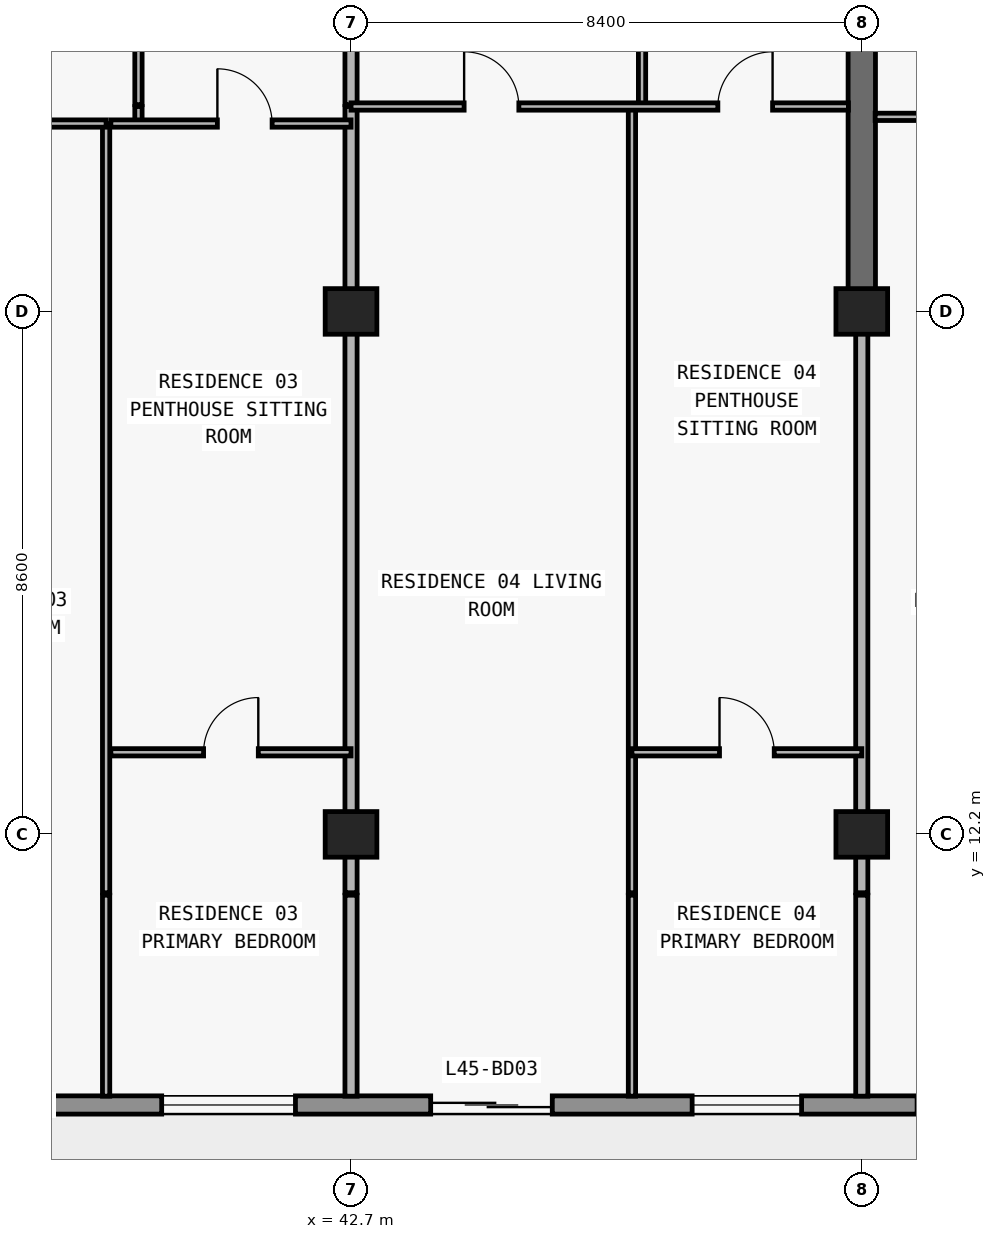
"""IFC4 building model, lengths in metres.
Left out: names, types, materials, properties, quantities, classifications, styles, units other than length and angle.
Written with IfcOpenShell. Run it as: python <this file> out.ifc"""

import sys

from ifc_helpers import new_model, si_unit, direction, frame, frame_2d, origin, origin_2d, place, context, subcontext, project, spatial, rectangle, extrude, element, fill, save


model = new_model("IFC4")
c1 = context("Model", 3, precision=1e-05, world=origin(), true_north=direction((0.0, 1.0)))
c2 = subcontext(c1, "Body", "Model", "MODEL_VIEW")
j1 = project(units=[si_unit("LENGTHUNIT", "METRE"), si_unit("PLANEANGLEUNIT", "RADIAN")], contexts=[c1])
p1 = place(None, origin())
s1 = spatial("IfcSite", under=j1, at=p1, CompositionType="ELEMENT")
p2 = place(p1, origin())
s2 = spatial("IfcBuilding", under=s1, at=p2, CompositionType="ELEMENT")
p3 = place(p2, frame((0.0, 0.0, 163.8)))
s3 = spatial("IfcBuildingStorey", under=s2, at=p3, CompositionType="ELEMENT", Elevation=163.8)
for number, where, z_axis, x_axis in (
    (1, (42.7, 12.2, 0.0), (0.0, 0.0, 1.0), (1.0, 0.0, 0.0)),
    (2, (51.1, 12.2, 0.0), (0.0, 0.0, 1.0), (1.0, 0.0, 0.0)),
    (3, (42.7, 20.8, 0.0), (0.0, 0.0, 1.0), (1.0, 0.0, 0.0)),
    (4, (51.1, 20.8, 0.0), (0.0, 0.0, 1.0), (1.0, 0.0, 0.0)),
):
    element("IfcColumn", number, at=place(p3, frame(where, z_axis=z_axis, x_axis=x_axis)), inside=s3, PredefinedType="COLUMN", context=c2, shape_type="SweptSolid", body=[
        extrude(rectangle(XDim=0.85, YDim=0.75, at=origin_2d()), origin(), (0.0, 0.0, 1.0), 3.05),
    ])
p4 = place(p3, frame((51.1, 20.8, 0.0), z_axis=(0.0, 0.0, 1.0), x_axis=(0.0, 1.0, 0.0)))
e5 = element("IfcWall", 5, at=p4, inside=s3, PredefinedType="SHEAR", context=c2, shape_type="SweptSolid", body=[
    extrude(rectangle(XDim=8.6, YDim=0.45, at=frame_2d((4.3, 0.0))), origin(), (0.0, 0.0, 1.0), 3.05),
])
p5 = place(p3, frame((67.7, 7.75, 0.0), z_axis=(0.0, 0.0, 1.0), x_axis=(-1.0, 0.0, 0.0)))
e6 = element("IfcWall", 6, at=p5, inside=s3, PredefinedType="STANDARD", context=c2, shape_type="SweptSolid", body=[
    extrude(rectangle(XDim=57.6, YDim=0.3, at=frame_2d((28.8, 0.0))), origin(), (0.0, 0.0, 1.0), 3.05),
])
p6 = place(p5, frame((54.69, 0.0, 0.0)))
e7 = element("IfcOpeningElement", 7, at=p6, cuts=e6, PredefinedType="OPENING", context=c2, shape_type="SweptSolid", body=[
    extrude(rectangle(XDim=2.0, YDim=2.3, at=frame_2d((1.0, 1.15))), frame((0.0, 0.16, 0.0), z_axis=(0.0, -1.0, 0.0), x_axis=(1.0, 0.0, 0.0)), (0.0, 0.0, 1.0), 0.32),
])
p7 = place(p5, frame((50.21, 0.0, 0.65)))
e8 = element("IfcOpeningElement", 8, at=p7, cuts=e6, PredefinedType="OPENING", context=c2, shape_type="SweptSolid", body=[
    extrude(rectangle(XDim=2.6, YDim=1.85, at=frame_2d((1.3, 0.925))), frame((0.0, 0.16, 0.0), z_axis=(0.0, -1.0, 0.0), x_axis=(1.0, 0.0, 0.0)), (0.0, 0.0, 1.0), 0.32),
])
p8 = place(p5, frame((44.1, 0.0, 0.85)))
e9 = element("IfcOpeningElement", 9, at=p8, cuts=e6, PredefinedType="OPENING", context=c2, shape_type="SweptSolid", body=[
    extrude(rectangle(XDim=2.2, YDim=1.55, at=frame_2d((1.1, 0.775))), frame((0.0, 0.16, 0.0), z_axis=(0.0, -1.0, 0.0), x_axis=(1.0, 0.0, 0.0)), (0.0, 0.0, 1.0), 0.32),
])
p9 = place(p5, frame((37.69, 0.0, 0.0)))
e10 = element("IfcOpeningElement", 10, at=p9, cuts=e6, PredefinedType="OPENING", context=c2, shape_type="SweptSolid", body=[
    extrude(rectangle(XDim=2.0, YDim=2.3, at=frame_2d((1.0, 1.15))), frame((0.0, 0.16, 0.0), z_axis=(0.0, -1.0, 0.0), x_axis=(1.0, 0.0, 0.0)), (0.0, 0.0, 1.0), 0.32),
])
p10 = place(p5, frame((33.59, 0.0, 0.85)))
e11 = element("IfcOpeningElement", 11, at=p10, cuts=e6, PredefinedType="OPENING", context=c2, shape_type="SweptSolid", body=[
    extrude(rectangle(XDim=1.8, YDim=1.55, at=frame_2d((0.9, 0.775))), frame((0.0, 0.16, 0.0), z_axis=(0.0, -1.0, 0.0), x_axis=(1.0, 0.0, 0.0)), (0.0, 0.0, 1.0), 0.32),
])
p11 = place(p5, frame((25.914, 0.0, 0.85)))
e12 = element("IfcOpeningElement", 12, at=p11, cuts=e6, PredefinedType="OPENING", context=c2, shape_type="SweptSolid", body=[
    extrude(rectangle(XDim=2.2, YDim=1.55, at=frame_2d((1.1, 0.775))), frame((0.0, 0.16, 0.0), z_axis=(0.0, -1.0, 0.0), x_axis=(1.0, 0.0, 0.0)), (0.0, 0.0, 1.0), 0.32),
])
p12 = place(p5, frame((21.69, 0.0, 0.0)))
e13 = element("IfcOpeningElement", 13, at=p12, cuts=e6, PredefinedType="OPENING", context=c2, shape_type="SweptSolid", body=[
    extrude(rectangle(XDim=2.0, YDim=2.3, at=frame_2d((1.0, 1.15))), frame((0.0, 0.16, 0.0), z_axis=(0.0, -1.0, 0.0), x_axis=(1.0, 0.0, 0.0)), (0.0, 0.0, 1.0), 0.32),
])
p13 = place(p5, frame((17.59, 0.0, 0.85)))
e14 = element("IfcOpeningElement", 14, at=p13, cuts=e6, PredefinedType="OPENING", context=c2, shape_type="SweptSolid", body=[
    extrude(rectangle(XDim=1.8, YDim=1.55, at=frame_2d((0.9, 0.775))), frame((0.0, 0.16, 0.0), z_axis=(0.0, -1.0, 0.0), x_axis=(1.0, 0.0, 0.0)), (0.0, 0.0, 1.0), 0.32),
])
p14 = place(p5, frame((13.69, 0.0, 0.0)))
e15 = element("IfcOpeningElement", 15, at=p14, cuts=e6, PredefinedType="OPENING", context=c2, shape_type="SweptSolid", body=[
    extrude(rectangle(XDim=2.0, YDim=2.3, at=frame_2d((1.0, 1.15))), frame((0.0, 0.16, 0.0), z_axis=(0.0, -1.0, 0.0), x_axis=(1.0, 0.0, 0.0)), (0.0, 0.0, 1.0), 0.32),
])
p15 = place(p5, frame((9.01, 0.0, 0.65)))
e16 = element("IfcOpeningElement", 16, at=p15, cuts=e6, PredefinedType="OPENING", context=c2, shape_type="SweptSolid", body=[
    extrude(rectangle(XDim=2.6, YDim=1.85, at=frame_2d((1.3, 0.925))), frame((0.0, 0.16, 0.0), z_axis=(0.0, -1.0, 0.0), x_axis=(1.0, 0.0, 0.0)), (0.0, 0.0, 1.0), 0.32),
])
p16 = place(p5, frame((3.0, 0.0, 0.85)))
e17 = element("IfcOpeningElement", 17, at=p16, cuts=e6, PredefinedType="OPENING", context=c2, shape_type="SweptSolid", body=[
    extrude(rectangle(XDim=2.2, YDim=1.55, at=frame_2d((1.1, 0.775))), frame((0.0, 0.16, 0.0), z_axis=(0.0, -1.0, 0.0), x_axis=(1.0, 0.0, 0.0)), (0.0, 0.0, 1.0), 0.32),
])
p17 = place(p3, frame((38.672, 7.895, 0.0), z_axis=(0.0, 0.0, 1.0), x_axis=(0.0, 1.0, 0.0)))
e18 = element("IfcWall", 18, at=p17, inside=s3, PredefinedType="PARTITIONING", context=c2, shape_type="SweptSolid", body=[
    extrude(rectangle(XDim=3.305, YDim=0.12, at=frame_2d((1.652, 0.0))), origin(), (0.0, 0.0, 1.0), 3.05),
])
p18 = place(p3, frame((38.672, 11.24, 0.0), z_axis=(0.0, 0.0, 1.0), x_axis=(0.0, 1.0, 0.0)))
e19 = element("IfcWall", 19, at=p18, inside=s3, PredefinedType="PARTITIONING", context=c2, shape_type="SweptSolid", body=[
    extrude(rectangle(XDim=12.65, YDim=0.12, at=frame_2d((6.325, 0.0))), origin(), (0.0, 0.0, 1.0), 2.499),
])
p19 = place(p3, frame((39.204, 23.89, 0.0), z_axis=(0.0, 0.0, 1.0), x_axis=(0.0, 1.0, 0.0)))
e20 = element("IfcWall", 20, at=p19, inside=s3, PredefinedType="PARTITIONING", context=c2, shape_type="SweptSolid", body=[
    extrude(rectangle(XDim=0.28, YDim=0.12, at=frame_2d((0.14, 0.0))), origin(), (0.0, 0.0, 1.0), 3.05),
])
p20 = place(p3, frame((39.204, 24.2, 0.0), z_axis=(0.0, 0.0, 1.0), x_axis=(0.0, 1.0, 0.0)))
e21 = element("IfcWall", 21, at=p20, inside=s3, PredefinedType="PARTITIONING", context=c2, shape_type="SweptSolid", body=[
    extrude(rectangle(XDim=4.84, YDim=0.12, at=frame_2d((2.42, 0.0))), origin(), (0.0, 0.0, 1.0), 3.05),
])
p21 = place(p20, frame((1.97, 0.0, 0.0)))
e22 = element("IfcOpeningElement", 22, at=p21, cuts=e21, PredefinedType="OPENING", context=c2, shape_type="SweptSolid", body=[
    extrude(rectangle(XDim=0.9, YDim=2.15, at=frame_2d((0.45, 1.075))), frame((0.0, 0.07, 0.0), z_axis=(0.0, -1.0, 0.0), x_axis=(1.0, 0.0, 0.0)), (0.0, 0.0, 1.0), 0.14),
])
p22 = place(p3, frame((42.7, 7.895, 0.0), z_axis=(0.0, 0.0, 1.0), x_axis=(0.0, 1.0, 0.0)))
e23 = element("IfcWall", 23, at=p22, inside=s3, PredefinedType="PARTITIONING", context=c2, shape_type="SweptSolid", body=[
    extrude(rectangle(XDim=3.305, YDim=0.2, at=frame_2d((1.652, 0.0))), origin(), (0.0, 0.0, 1.0), 3.05),
])
p23 = place(p3, frame((42.7, 11.24, 0.0), z_axis=(0.0, 0.0, 1.0), x_axis=(0.0, 1.0, 0.0)))
e24 = element("IfcWall", 24, at=p23, inside=s3, PredefinedType="PARTITIONING", context=c2, shape_type="SweptSolid", body=[
    extrude(rectangle(XDim=12.93, YDim=0.2, at=frame_2d((6.465, 0.0))), origin(), (0.0, 0.0, 1.0), 2.263),
])
p24 = place(p3, frame((42.7, 24.2, 0.0), z_axis=(0.0, 0.0, 1.0), x_axis=(0.0, 1.0, 0.0)))
e25 = element("IfcWall", 25, at=p24, inside=s3, PredefinedType="PARTITIONING", context=c2, shape_type="SweptSolid", body=[
    extrude(rectangle(XDim=4.84, YDim=0.2, at=frame_2d((2.42, 0.0))), origin(), (0.0, 0.0, 1.0), 2.263),
])
p25 = place(p3, frame((47.32, 7.895, 0.0), z_axis=(0.0, 0.0, 1.0), x_axis=(0.0, 1.0, 0.0)))
e26 = element("IfcWall", 26, at=p25, inside=s3, PredefinedType="PARTITIONING", context=c2, shape_type="SweptSolid", body=[
    extrude(rectangle(XDim=3.305, YDim=0.12, at=frame_2d((1.652, 0.0))), origin(), (0.0, 0.0, 1.0), 3.05),
])
p26 = place(p3, frame((47.32, 11.24, 0.0), z_axis=(0.0, 0.0, 1.0), x_axis=(0.0, 1.0, 0.0)))
e27 = element("IfcWall", 27, at=p26, inside=s3, PredefinedType="PARTITIONING", context=c2, shape_type="SweptSolid", body=[
    extrude(rectangle(XDim=12.93, YDim=0.12, at=frame_2d((6.465, 0.0))), origin(), (0.0, 0.0, 1.0), 3.05),
])
p27 = place(p3, frame((47.486, 24.2, 0.0), z_axis=(0.0, 0.0, 1.0), x_axis=(0.0, 1.0, 0.0)))
e28 = element("IfcWall", 28, at=p27, inside=s3, PredefinedType="PARTITIONING", context=c2, shape_type="SweptSolid", body=[
    extrude(rectangle(XDim=4.84, YDim=0.12, at=frame_2d((2.42, 0.0))), origin(), (0.0, 0.0, 1.0), 3.05),
])
p28 = place(p27, frame((1.97, 0.0, 0.0)))
e29 = element("IfcOpeningElement", 29, at=p28, cuts=e28, PredefinedType="OPENING", context=c2, shape_type="SweptSolid", body=[
    extrude(rectangle(XDim=0.9, YDim=2.15, at=frame_2d((0.45, 1.075))), frame((0.0, 0.07, 0.0), z_axis=(0.0, -1.0, 0.0), x_axis=(1.0, 0.0, 0.0)), (0.0, 0.0, 1.0), 0.14),
])
p29 = place(p3, frame((51.1, 7.895, 0.0), z_axis=(0.0, 0.0, 1.0), x_axis=(0.0, 1.0, 0.0)))
e30 = element("IfcWall", 30, at=p29, inside=s3, PredefinedType="PARTITIONING", context=c2, shape_type="SweptSolid", body=[
    extrude(rectangle(XDim=3.305, YDim=0.2, at=frame_2d((1.652, 0.0))), origin(), (0.0, 0.0, 1.0), 3.05),
])
p30 = place(p3, frame((51.1, 11.24, 0.0), z_axis=(0.0, 0.0, 1.0), x_axis=(0.0, 1.0, 0.0)))
e31 = element("IfcWall", 31, at=p30, inside=s3, PredefinedType="PARTITIONING", context=c2, shape_type="SweptSolid", body=[
    extrude(rectangle(XDim=9.555, YDim=0.2, at=frame_2d((4.777, 0.0))), origin(), (0.0, 0.0, 1.0), 2.263),
])
p31 = place(p3, frame((38.75, 13.55, 0.0), z_axis=(0.0, 0.0, 1.0), x_axis=(1.0, 0.0, 0.0)))
e32 = element("IfcWall", 32, at=p31, inside=s3, PredefinedType="PARTITIONING", context=c2, shape_type="SweptSolid", body=[
    extrude(rectangle(XDim=3.95, YDim=0.12, at=frame_2d((1.975, 0.0))), origin(), (0.0, 0.0, 1.0), 3.05),
])
p32 = place(p31, frame((1.525, 0.0, 0.0)))
e33 = element("IfcOpeningElement", 33, at=p32, cuts=e32, PredefinedType="OPENING", context=c2, shape_type="SweptSolid", body=[
    extrude(rectangle(XDim=0.9, YDim=2.15, at=frame_2d((0.45, 1.075))), frame((0.0, 0.07, 0.0), z_axis=(0.0, -1.0, 0.0), x_axis=(1.0, 0.0, 0.0)), (0.0, 0.0, 1.0), 0.14),
])
p33 = place(p3, frame((47.32, 13.55, 0.0), z_axis=(0.0, 0.0, 1.0), x_axis=(1.0, 0.0, 0.0)))
e34 = element("IfcWall", 34, at=p33, inside=s3, PredefinedType="PARTITIONING", context=c2, shape_type="SweptSolid", body=[
    extrude(rectangle(XDim=3.78, YDim=0.12, at=frame_2d((1.89, 0.0))), origin(), (0.0, 0.0, 1.0), 3.05),
])
p34 = place(p33, frame((1.44, 0.0, 0.0)))
e35 = element("IfcOpeningElement", 35, at=p34, cuts=e34, PredefinedType="OPENING", context=c2, shape_type="SweptSolid", body=[
    extrude(rectangle(XDim=0.9, YDim=2.15, at=frame_2d((0.45, 1.075))), frame((0.0, 0.07, 0.0), z_axis=(0.0, -1.0, 0.0), x_axis=(1.0, 0.0, 0.0)), (0.0, 0.0, 1.0), 0.14),
])
p35 = place(p3, frame((35.1, 23.89, 0.0), z_axis=(0.0, 0.0, 1.0), x_axis=(1.0, 0.0, 0.0)))
e36 = element("IfcWall", 36, at=p35, inside=s3, PredefinedType="PARTITIONING", context=c2, shape_type="SweptSolid", body=[
    extrude(rectangle(XDim=3.572, YDim=0.12, at=frame_2d((1.786, 0.0))), origin(), (0.0, 0.0, 1.0), 3.05),
])
p36 = place(p35, frame((1.336, 0.0, 0.0)))
e37 = element("IfcOpeningElement", 37, at=p36, cuts=e36, PredefinedType="OPENING", context=c2, shape_type="SweptSolid", body=[
    extrude(rectangle(XDim=0.9, YDim=2.15, at=frame_2d((0.45, 1.075))), frame((0.0, 0.07, 0.0), z_axis=(0.0, -1.0, 0.0), x_axis=(1.0, 0.0, 0.0)), (0.0, 0.0, 1.0), 0.14),
])
p37 = place(p3, frame((38.75, 23.89, 0.0), z_axis=(0.0, 0.0, 1.0), x_axis=(1.0, 0.0, 0.0)))
e38 = element("IfcWall", 38, at=p37, inside=s3, PredefinedType="PARTITIONING", context=c2, shape_type="SweptSolid", body=[
    extrude(rectangle(XDim=3.95, YDim=0.12, at=frame_2d((1.975, 0.0))), origin(), (0.0, 0.0, 1.0), 3.05),
])
p38 = place(p37, frame((1.752, 0.0, 0.0)))
e39 = element("IfcOpeningElement", 39, at=p38, cuts=e38, PredefinedType="OPENING", context=c2, shape_type="SweptSolid", body=[
    extrude(rectangle(XDim=0.9, YDim=2.15, at=frame_2d((0.45, 1.075))), frame((0.0, 0.07, 0.0), z_axis=(0.0, -1.0, 0.0), x_axis=(1.0, 0.0, 0.0)), (0.0, 0.0, 1.0), 0.14),
])
p39 = place(p3, frame((51.32, 24.0, 0.0), z_axis=(0.0, 0.0, 1.0), x_axis=(1.0, 0.0, 0.0)))
e40 = element("IfcWall", 40, at=p39, inside=s3, PredefinedType="PARTITIONING", context=c2, shape_type="SweptSolid", body=[
    extrude(rectangle(XDim=8.18, YDim=0.12, at=frame_2d((4.09, 0.0))), origin(), (0.0, 0.0, 1.0), 3.05),
])
p40 = place(p39, frame((1.33, 0.0, 0.0)))
e41 = element("IfcOpeningElement", 41, at=p40, cuts=e40, PredefinedType="OPENING", context=c2, shape_type="SweptSolid", body=[
    extrude(rectangle(XDim=0.9, YDim=2.15, at=frame_2d((0.45, 1.075))), frame((0.0, 0.07, 0.0), z_axis=(0.0, -1.0, 0.0), x_axis=(1.0, 0.0, 0.0)), (0.0, 0.0, 1.0), 0.14),
])
p41 = place(p3, frame((42.7, 24.17, 0.0), z_axis=(0.0, 0.0, 1.0), x_axis=(1.0, 0.0, 0.0)))
e42 = element("IfcWall", 42, at=p41, inside=s3, PredefinedType="PARTITIONING", context=c2, shape_type="SweptSolid", body=[
    extrude(rectangle(XDim=8.18, YDim=0.12, at=frame_2d((4.09, 0.0))), origin(), (0.0, 0.0, 1.0), 3.05),
])
p42 = place(p41, frame((1.86, 0.0, 0.0)))
e43 = element("IfcOpeningElement", 43, at=p42, cuts=e42, PredefinedType="OPENING", context=c2, shape_type="SweptSolid", body=[
    extrude(rectangle(XDim=0.9, YDim=2.15, at=frame_2d((0.45, 1.075))), frame((0.0, 0.07, 0.0), z_axis=(0.0, -1.0, 0.0), x_axis=(1.0, 0.0, 0.0)), (0.0, 0.0, 1.0), 0.14),
])
p43 = place(p41, frame((6.033, 0.0, 0.0)))
e44 = element("IfcOpeningElement", 44, at=p43, cuts=e42, PredefinedType="OPENING", context=c2, shape_type="SweptSolid", body=[
    extrude(rectangle(XDim=0.9, YDim=2.15, at=frame_2d((0.45, 1.075))), frame((0.0, 0.07, 0.0), z_axis=(0.0, -1.0, 0.0), x_axis=(1.0, 0.0, 0.0)), (0.0, 0.0, 1.0), 0.14),
])
p44 = place(p11, origin())
e45 = element("IfcWindow", 45, at=p44, inside=s3, PartitioningType="SINGLE_PANEL", PredefinedType="WINDOW", context=c2, shape_type="SweptSolid", body=[
    extrude(rectangle(XDim=2.2, YDim=1.55, at=frame_2d((1.1, 0.775))), frame((0.0, 0.03, 0.0), z_axis=(0.0, -1.0, 0.0), x_axis=(1.0, 0.0, 0.0)), (0.0, 0.0, 1.0), 0.06),
])
fill(e12, e45)
p45 = place(p12, origin())
e46 = element("IfcDoor", 46, at=p45, inside=s3, OperationType="DOUBLE_DOOR_SLIDING", PredefinedType="DOOR", context=c2, shape_type="SweptSolid", body=[
    extrude(rectangle(XDim=2.0, YDim=2.3, at=frame_2d((1.0, 1.15))), frame((0.0, 0.025, 0.0), z_axis=(0.0, -1.0, 0.0), x_axis=(1.0, 0.0, 0.0)), (0.0, 0.0, 1.0), 0.05),
])
fill(e13, e46)
p46 = place(p13, origin())
e47 = element("IfcWindow", 47, at=p46, inside=s3, PartitioningType="SINGLE_PANEL", PredefinedType="WINDOW", context=c2, shape_type="SweptSolid", body=[
    extrude(rectangle(XDim=1.8, YDim=1.55, at=frame_2d((0.9, 0.775))), frame((0.0, 0.03, 0.0), z_axis=(0.0, -1.0, 0.0), x_axis=(1.0, 0.0, 0.0)), (0.0, 0.0, 1.0), 0.06),
])
fill(e14, e47)
p47 = place(p38, origin())
e48 = element("IfcDoor", 48, at=p47, inside=s3, OperationType="SINGLE_SWING_LEFT", PredefinedType="DOOR", context=c2, shape_type="SweptSolid", body=[
    extrude(rectangle(XDim=0.9, YDim=2.15, at=frame_2d((0.45, 1.075))), frame((0.0, 0.025, 0.0), z_axis=(0.0, -1.0, 0.0), x_axis=(1.0, 0.0, 0.0)), (0.0, 0.0, 1.0), 0.05),
])
fill(e39, e48)
p48 = place(p32, origin())
e49 = element("IfcDoor", 49, at=p48, inside=s3, OperationType="SINGLE_SWING_RIGHT", PredefinedType="DOOR", context=c2, shape_type="SweptSolid", body=[
    extrude(rectangle(XDim=0.9, YDim=2.15, at=frame_2d((0.45, 1.075))), frame((0.0, 0.025, 0.0), z_axis=(0.0, -1.0, 0.0), x_axis=(1.0, 0.0, 0.0)), (0.0, 0.0, 1.0), 0.05),
])
fill(e33, e49)
p49 = place(p42, origin())
e50 = element("IfcDoor", 50, at=p49, inside=s3, OperationType="SINGLE_SWING_LEFT", PredefinedType="DOOR", context=c2, shape_type="SweptSolid", body=[
    extrude(rectangle(XDim=0.9, YDim=2.15, at=frame_2d((0.45, 1.075))), frame((0.0, 0.025, 0.0), z_axis=(0.0, -1.0, 0.0), x_axis=(1.0, 0.0, 0.0)), (0.0, 0.0, 1.0), 0.05),
])
fill(e43, e50)
p50 = place(p43, origin())
e51 = element("IfcDoor", 51, at=p50, inside=s3, OperationType="SINGLE_SWING_RIGHT", PredefinedType="DOOR", context=c2, shape_type="SweptSolid", body=[
    extrude(rectangle(XDim=0.9, YDim=2.15, at=frame_2d((0.45, 1.075))), frame((0.0, 0.025, 0.0), z_axis=(0.0, -1.0, 0.0), x_axis=(1.0, 0.0, 0.0)), (0.0, 0.0, 1.0), 0.05),
])
fill(e44, e51)
p51 = place(p34, origin())
e52 = element("IfcDoor", 52, at=p51, inside=s3, OperationType="SINGLE_SWING_LEFT", PredefinedType="DOOR", context=c2, shape_type="SweptSolid", body=[
    extrude(rectangle(XDim=0.9, YDim=2.15, at=frame_2d((0.45, 1.075))), frame((0.0, 0.025, 0.0), z_axis=(0.0, -1.0, 0.0), x_axis=(1.0, 0.0, 0.0)), (0.0, 0.0, 1.0), 0.05),
])
fill(e35, e52)
save(model, sys.argv[1])
